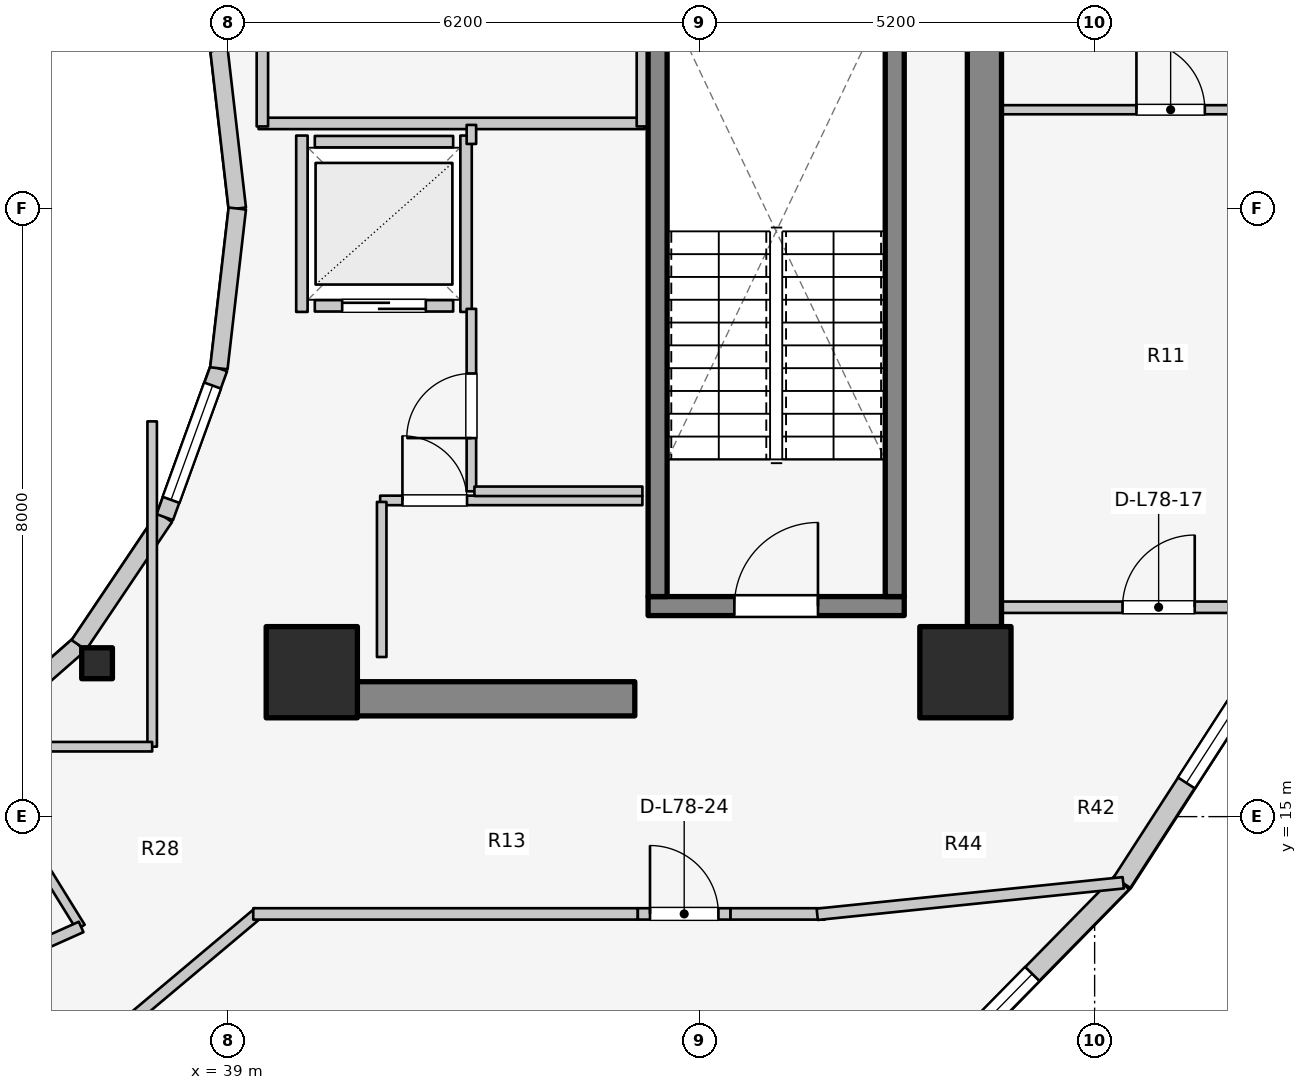
"""IFC4 building model, lengths in metres.
Left out: names, types, materials, properties, quantities, classifications, styles, units other than length and angle.
Written with IfcOpenShell. Run it as: python <this file> out.ifc"""

import sys

from ifc_helpers import new_model, si_unit, direction, frame, frame_2d, origin, origin_2d, place, context, subcontext, project, spatial, rectangle, i_section, extrude, element, fill, save


model = new_model("IFC4")
c1 = context("Model", 3, precision=1e-05, world=origin(), true_north=direction((0.0, 1.0)))
c2 = subcontext(c1, "Body", "Model", "MODEL_VIEW")
j1 = project(units=[si_unit("LENGTHUNIT", "METRE"), si_unit("PLANEANGLEUNIT", "RADIAN")], contexts=[c1])
p1 = place(None, origin())
s1 = spatial("IfcSite", under=j1, at=p1, CompositionType="ELEMENT")
p2 = place(p1, origin())
s2 = spatial("IfcBuilding", under=s1, at=p2, CompositionType="ELEMENT")
p3 = place(p2, frame((0.0, 0.0, 256.8)))
s3 = spatial("IfcBuildingStorey", under=s2, at=p3, CompositionType="ELEMENT", Elevation=256.8)
p4 = place(p3, frame((48.95, 17.05, 0.0), z_axis=(0.0, 0.0, 1.0), x_axis=(0.0, 1.0, 0.0)))
e1 = element("IfcWall", 1, at=p4, inside=s3, PredefinedType="SHEAR", context=c2, shape_type="SweptSolid", body=[
    extrude(rectangle(XDim=12.8, YDim=0.45, at=frame_2d((6.4, 0.0))), origin(), (0.0, 0.0, 1.0), 3.6),
])
p5 = place(p3, frame((39.85, 16.55, 0.0), z_axis=(0.0, 0.0, 1.0), x_axis=(1.0, 0.0, 0.0)))
e2 = element("IfcWall", 2, at=p5, inside=s3, PredefinedType="SHEAR", context=c2, shape_type="SweptSolid", body=[
    extrude(rectangle(XDim=4.5, YDim=0.45, at=frame_2d((2.25, 0.0))), origin(), (0.0, 0.0, 1.0), 3.6),
])
p6 = place(p3, frame((44.525, 17.77, 0.0), z_axis=(0.0, 0.0, 1.0), x_axis=(1.0, 0.0, 0.0)))
e3 = element("IfcWall", 3, at=p6, inside=s3, PredefinedType="SOLIDWALL", context=c2, shape_type="SweptSolid", body=[
    extrude(rectangle(XDim=3.37, YDim=0.25, at=frame_2d((1.685, 0.0))), origin(), (0.0, 0.0, 1.0), 3.6),
])
p7 = place(p6, frame((1.135, 0.0, 0.0)))
e4 = element("IfcOpeningElement", 4, at=p7, cuts=e3, PredefinedType="OPENING", context=c2, shape_type="SweptSolid", body=[
    extrude(rectangle(XDim=1.1, YDim=2.1, at=frame_2d((0.55, 1.05))), frame((0.0, 0.135, 0.0), z_axis=(0.0, -1.0, 0.0), x_axis=(1.0, 0.0, 0.0)), (0.0, 0.0, 1.0), 0.27),
])
for number, where, z_axis, x_axis in (
    (5, (44.65, 17.895, 0.0), (0.0, 0.0, 1.0), (0.0, 1.0, 0.0)),
    (6, (47.77, 17.895, 0.0), (0.0, 0.0, 1.0), (0.0, 1.0, 0.0)),
):
    element("IfcWall", number, at=place(p3, frame(where, z_axis=z_axis, x_axis=x_axis)), inside=s3, PredefinedType="SOLIDWALL", context=c2, shape_type="SweptSolid", body=[
        extrude(rectangle(XDim=7.81, YDim=0.25, at=frame_2d((3.905, 0.0))), origin(), (0.0, 0.0, 1.0), 3.6),
    ])
for number, where, z_axis, x_axis in (
    (7, (40.1, 16.9, 0.0), (0.0, 0.0, 1.0), (1.0, 0.0, 0.0)),
    (8, (48.7, 16.9, 0.0), (0.0, 0.0, 1.0), (1.0, 0.0, 0.0)),
):
    element("IfcColumn", number, at=place(p3, frame(where, z_axis=z_axis, x_axis=x_axis)), inside=s3, PredefinedType="COLUMN", context=c2, shape_type="SweptSolid", body=[
        extrude(rectangle(XDim=1.2, YDim=1.2, at=origin_2d()), origin(), (0.0, 0.0, 1.0), 3.6),
    ])
p8 = place(p3, frame((37.275, 17.018, 0.0), z_axis=(0.0, 0.0, 1.0), x_axis=(1.0, 0.0, 0.0)))
e9 = element("IfcColumn", 9, at=p8, inside=s3, PredefinedType="COLUMN", context=c2, shape_type="SweptSolid", body=[
    extrude(i_section(OverallWidth=0.404, OverallDepth=0.407, WebThickness=0.027, FlangeThickness=0.044, FilletRadius=0.025, at=origin_2d()), origin(), (0.0, 0.0, 1.0), 3.6),
])
p9 = place(p3, frame((39.12, 23.0, 0.0), z_axis=(0.0, 0.0, 1.0), x_axis=(-0.114711713601, 0.993398823617, 0.0)))
e10 = element("IfcWall", 10, at=p9, inside=s3, PredefinedType="STANDARD", context=c2, shape_type="SweptSolid", body=[
    extrude(rectangle(XDim=2.115, YDim=0.23, at=frame_2d((1.058, 0.0))), origin(), (0.0, 0.0, 1.0), 3.06),
])
p10 = place(p3, frame((35.56, 15.968, 0.0), z_axis=(0.0, 0.0, 1.0), x_axis=(0.752576694707, 0.658504607869, 0.0)))
e11 = element("IfcWall", 11, at=p10, inside=s3, PredefinedType="STANDARD", context=c2, shape_type="SweptSolid", body=[
    extrude(rectangle(XDim=1.959, YDim=0.23, at=frame_2d((0.98, 0.0))), origin(), (0.0, 0.0, 1.0), 1.72),
])
p11 = place(p3, frame((37.035, 17.258, 0.0), z_axis=(0.0, 0.0, 1.0), x_axis=(0.558197800898, 0.829707909492, 0.0)))
e12 = element("IfcWall", 12, at=p11, inside=s3, PredefinedType="STANDARD", context=c2, shape_type="SweptSolid", body=[
    extrude(rectangle(XDim=2.027, YDim=0.23, at=frame_2d((1.013, 0.0))), origin(), (0.0, 0.0, 1.0), 1.72),
])
p12 = place(p3, frame((38.166, 18.94, 0.0), z_axis=(0.0, 0.0, 1.0), x_axis=(0.341423187295, 0.93990968033, 0.0)))
e13 = element("IfcWall", 13, at=p12, inside=s3, PredefinedType="STANDARD", context=c2, shape_type="SweptSolid", body=[
    extrude(rectangle(XDim=2.084, YDim=0.23, at=frame_2d((1.042, 0.0))), origin(), (0.0, 0.0, 1.0), 3.06),
])
p13 = place(p12, frame((0.242, 0.0, 0.85)))
e14 = element("IfcOpeningElement", 14, at=p13, cuts=e13, PredefinedType="OPENING", context=c2, shape_type="SweptSolid", body=[
    extrude(rectangle(XDim=1.6, YDim=1.65, at=frame_2d((0.8, 0.825))), frame((0.0, 0.125, 0.0), z_axis=(0.0, -1.0, 0.0), x_axis=(1.0, 0.0, 0.0)), (0.0, 0.0, 1.0), 0.25),
])
p14 = place(p3, frame((38.877, 20.898, 0.0), z_axis=(0.0, 0.0, 1.0), x_axis=(0.114711713601, 0.993398823617, 0.0)))
e15 = element("IfcWall", 15, at=p14, inside=s3, PredefinedType="STANDARD", context=c2, shape_type="SweptSolid", body=[
    extrude(rectangle(XDim=2.115, YDim=0.23, at=frame_2d((1.058, 0.0))), origin(), (0.0, 0.0, 1.0), 3.06),
])
p15 = place(p3, frame((47.558, 10.871, 0.0), z_axis=(0.0, 0.0, 1.0), x_axis=(0.700642973333, 0.713512034881, 0.0)))
e16 = element("IfcWall", 16, at=p15, inside=s3, PredefinedType="STANDARD", context=c2, shape_type="SweptSolid", body=[
    extrude(rectangle(XDim=4.572, YDim=0.26, at=frame_2d((2.286, 0.0))), origin(), (0.0, 0.0, 1.0), 1.72),
])
p16 = place(p15, frame((1.686, 0.0, 0.15)))
e17 = element("IfcOpeningElement", 17, at=p16, cuts=e16, PredefinedType="OPENING", context=c2, shape_type="SweptSolid", body=[
    extrude(rectangle(XDim=1.2, YDim=0.9, at=frame_2d((0.6, 0.45))), frame((0.0, 0.14, 0.0), z_axis=(0.0, -1.0, 0.0), x_axis=(1.0, 0.0, 0.0)), (0.0, 0.0, 1.0), 0.28),
])
p17 = place(p3, frame((50.761, 14.133, 0.0), z_axis=(0.0, 0.0, 1.0), x_axis=(0.542641766008, 0.839964233634, 0.0)))
e18 = element("IfcWall", 18, at=p17, inside=s3, PredefinedType="STANDARD", context=c2, shape_type="SweptSolid", body=[
    extrude(rectangle(XDim=4.319, YDim=0.26, at=frame_2d((2.16, 0.0))), origin(), (0.0, 0.0, 1.0), 1.72),
])
p18 = place(p17, frame((1.56, 0.0, 0.15)))
e19 = element("IfcOpeningElement", 19, at=p18, cuts=e18, PredefinedType="OPENING", context=c2, shape_type="SweptSolid", body=[
    extrude(rectangle(XDim=1.2, YDim=0.9, at=frame_2d((0.6, 0.45))), frame((0.0, 0.14, 0.0), z_axis=(0.0, -1.0, 0.0), x_axis=(1.0, 0.0, 0.0)), (0.0, 0.0, 1.0), 0.28),
])
p19 = place(p3, frame((40.14, 21.72, 0.0), z_axis=(0.0, 0.0, 1.0), x_axis=(1.0, 0.0, 0.0)))
e20 = element("IfcWall", 20, at=p19, inside=s3, PredefinedType="SOLIDWALL", context=c2, shape_type="SweptSolid", body=[
    extrude(rectangle(XDim=1.82, YDim=0.15, at=frame_2d((0.91, 0.0))), origin(), (0.0, 0.0, 1.0), 2.62),
])
p20 = place(p19, frame((0.36, 0.0, 0.0)))
e21 = element("IfcOpeningElement", 21, at=p20, cuts=e20, PredefinedType="OPENING", context=c2, shape_type="SweptSolid", body=[
    extrude(rectangle(XDim=1.1, YDim=2.1, at=frame_2d((0.55, 1.05))), frame((0.0, 0.085, 0.0), z_axis=(0.0, -1.0, 0.0), x_axis=(1.0, 0.0, 0.0)), (0.0, 0.0, 1.0), 0.17),
])
p21 = place(p3, frame((40.14, 23.88, 0.0), z_axis=(0.0, 0.0, 1.0), x_axis=(1.0, 0.0, 0.0)))
e22 = element("IfcWall", 22, at=p21, inside=s3, PredefinedType="SOLIDWALL", context=c2, shape_type="SweptSolid", body=[
    extrude(rectangle(XDim=1.82, YDim=0.15, at=frame_2d((0.91, 0.0))), origin(), (0.0, 0.0, 1.0), 2.62),
])
p22 = place(p3, frame((39.97, 21.64, 0.0), z_axis=(0.0, 0.0, 1.0), x_axis=(0.0, 1.0, 0.0)))
e23 = element("IfcWall", 23, at=p22, inside=s3, PredefinedType="SOLIDWALL", context=c2, shape_type="SweptSolid", body=[
    extrude(rectangle(XDim=2.32, YDim=0.15, at=frame_2d((1.16, 0.0))), origin(), (0.0, 0.0, 1.0), 2.62),
])
p23 = place(p3, frame((42.13, 21.64, 0.0), z_axis=(0.0, 0.0, 1.0), x_axis=(0.0, 1.0, 0.0)))
e24 = element("IfcWall", 24, at=p23, inside=s3, PredefinedType="SOLIDWALL", context=c2, shape_type="SweptSolid", body=[
    extrude(rectangle(XDim=2.32, YDim=0.15, at=frame_2d((1.16, 0.0))), origin(), (0.0, 0.0, 1.0), 3.075),
])
p24 = place(p3, frame((39.4, 24.12, 0.0), z_axis=(0.0, 0.0, 1.0), x_axis=(1.0, 0.0, 0.0)))
e25 = element("IfcWall", 25, at=p24, inside=s3, PredefinedType="PARTITIONING", context=c2, shape_type="SweptSolid", body=[
    extrude(rectangle(XDim=5.08, YDim=0.15, at=frame_2d((2.54, 0.0))), origin(), (0.0, 0.0, 1.0), 2.62),
])
p25 = place(p3, frame((44.45, 24.08, 0.0), z_axis=(0.0, 0.0, 1.0), x_axis=(0.0, 1.0, 0.0)))
e26 = element("IfcWall", 26, at=p25, inside=s3, PredefinedType="PARTITIONING", context=c2, shape_type="SweptSolid", body=[
    extrude(rectangle(XDim=3.2, YDim=0.15, at=frame_2d((1.6, 0.0))), origin(), (0.0, 0.0, 1.0), 3.075),
])
p26 = place(p3, frame((39.45, 24.08, 0.0), z_axis=(0.0, 0.0, 1.0), x_axis=(0.0, 1.0, 0.0)))
e27 = element("IfcWall", 27, at=p26, inside=s3, PredefinedType="PARTITIONING", context=c2, shape_type="SweptSolid", body=[
    extrude(rectangle(XDim=3.4, YDim=0.15, at=frame_2d((1.7, 0.0))), origin(), (0.0, 0.0, 1.0), 3.075),
])
p27 = place(p26, frame((1.894, 0.0, 0.0)))
e28 = element("IfcOpeningElement", 28, at=p27, cuts=e27, PredefinedType="OPENING", context=c2, shape_type="SweptSolid", body=[
    extrude(rectangle(XDim=1.1, YDim=2.1, at=frame_2d((0.55, 1.05))), frame((0.0, 0.085, 0.0), z_axis=(0.0, -1.0, 0.0), x_axis=(1.0, 0.0, 0.0)), (0.0, 0.0, 1.0), 0.17),
])
p28 = place(p3, frame((41.0, 19.16, 0.0), z_axis=(0.0, 0.0, 1.0), x_axis=(1.0, 0.0, 0.0)))
e29 = element("IfcWall", 29, at=p28, inside=s3, PredefinedType="PARTITIONING", context=c2, shape_type="SweptSolid", body=[
    extrude(rectangle(XDim=3.45, YDim=0.125, at=frame_2d((1.725, 0.0))), origin(), (0.0, 0.0, 1.0), 2.62),
])
p29 = place(p28, frame((0.293, 0.0, 0.0)))
e30 = element("IfcOpeningElement", 30, at=p29, cuts=e29, PredefinedType="OPENING", context=c2, shape_type="SweptSolid", body=[
    extrude(rectangle(XDim=0.85, YDim=2.05, at=frame_2d((0.425, 1.025))), frame((0.0, 0.073, 0.0), z_axis=(0.0, -1.0, 0.0), x_axis=(1.0, 0.0, 0.0)), (0.0, 0.0, 1.0), 0.145),
])
p30 = place(p3, frame((41.02, 17.1, 0.0), z_axis=(0.0, 0.0, 1.0), x_axis=(0.0, 1.0, 0.0)))
e31 = element("IfcWall", 31, at=p30, inside=s3, PredefinedType="PARTITIONING", context=c2, shape_type="SweptSolid", body=[
    extrude(rectangle(XDim=2.04, YDim=0.125, at=frame_2d((1.02, 0.0))), origin(), (0.0, 0.0, 1.0), 3.075),
])
p31 = place(p3, frame((42.2, 19.28, 0.0), z_axis=(0.0, 0.0, 1.0), x_axis=(0.0, 1.0, 0.0)))
e32 = element("IfcWall", 32, at=p31, inside=s3, PredefinedType="PARTITIONING", context=c2, shape_type="SweptSolid", body=[
    extrude(rectangle(XDim=2.4, YDim=0.125, at=frame_2d((1.2, 0.0))), origin(), (0.0, 0.0, 1.0), 3.075),
])
p32 = place(p31, frame((0.7, 0.0, 0.0)))
e33 = element("IfcOpeningElement", 33, at=p32, cuts=e32, PredefinedType="OPENING", context=c2, shape_type="SweptSolid", body=[
    extrude(rectangle(XDim=0.85, YDim=2.05, at=frame_2d((0.425, 1.025))), frame((0.0, 0.073, 0.0), z_axis=(0.0, -1.0, 0.0), x_axis=(1.0, 0.0, 0.0)), (0.0, 0.0, 1.0), 0.145),
])
p33 = place(p3, frame((42.2, 23.85, 0.0), z_axis=(0.0, 0.0, 1.0), x_axis=(0.0, 1.0, 0.0)))
e34 = element("IfcWall", 34, at=p33, inside=s3, PredefinedType="PARTITIONING", context=c2, shape_type="SweptSolid", body=[
    extrude(rectangle(XDim=0.25, YDim=0.125, at=frame_2d((0.125, 0.0))), origin(), (0.0, 0.0, 1.0), 3.075),
])
p34 = place(p3, frame((42.24, 19.28, 0.0), z_axis=(0.0, 0.0, 1.0), x_axis=(1.0, 0.0, 0.0)))
e35 = element("IfcWall", 35, at=p34, inside=s3, PredefinedType="PARTITIONING", context=c2, shape_type="SweptSolid", body=[
    extrude(rectangle(XDim=2.21, YDim=0.125, at=frame_2d((1.105, 0.0))), origin(), (0.0, 0.0, 1.0), 2.62),
])
p35 = place(p3, frame((35.55, 15.985, 0.0), z_axis=(0.0, 0.0, 1.0), x_axis=(0.52592395012, -0.850531597702, 0.0)))
e36 = element("IfcWall", 36, at=p35, inside=s3, PredefinedType="PARTITIONING", context=c2, shape_type="SweptSolid", body=[
    extrude(rectangle(XDim=2.869, YDim=0.125, at=frame_2d((1.435, 0.0))), origin(), (0.0, 0.0, 1.0), 1.72),
])
p36 = place(p3, frame((36.525, 13.307, 0.0), z_axis=(0.0, 0.0, 1.0), x_axis=(0.912838500798, 0.408320794794, 0.0)))
e37 = element("IfcWall", 37, at=p36, inside=s3, PredefinedType="PARTITIONING", context=c2, shape_type="SweptSolid", body=[
    extrude(rectangle(XDim=0.591, YDim=0.15, at=frame_2d((0.296, 0.0))), origin(), (0.0, 0.0, 1.0), 3.075),
])
p37 = place(p3, frame((38.0, 15.92, 0.0), z_axis=(0.0, 0.0, 1.0), x_axis=(0.0, 1.0, 0.0)))
e38 = element("IfcWall", 38, at=p37, inside=s3, PredefinedType="PARTITIONING", context=c2, shape_type="SweptSolid", body=[
    extrude(rectangle(XDim=4.28, YDim=0.125, at=frame_2d((2.14, 0.0))), origin(), (0.0, 0.0, 1.0), 1.72),
])
p38 = place(p3, frame((35.4, 15.92, 0.0), z_axis=(0.0, 0.0, 1.0), x_axis=(1.0, 0.0, 0.0)))
e39 = element("IfcWall", 39, at=p38, inside=s3, PredefinedType="PARTITIONING", context=c2, shape_type="SweptSolid", body=[
    extrude(rectangle(XDim=2.6, YDim=0.125, at=frame_2d((1.3, 0.0))), origin(), (0.0, 0.0, 1.0), 1.72),
])
p39 = place(p3, frame((48.95, 17.755, 0.0), z_axis=(0.0, 0.0, 1.0), x_axis=(1.0, 0.0, 0.0)))
e40 = element("IfcWall", 40, at=p39, inside=s3, PredefinedType="PARTITIONING", context=c2, shape_type="SweptSolid", body=[
    extrude(rectangle(XDim=4.175, YDim=0.15, at=frame_2d((2.087, 0.0))), origin(), (0.0, 0.0, 1.0), 3.075),
])
p40 = place(p39, frame((1.817, 0.0, 0.0)))
e41 = element("IfcOpeningElement", 41, at=p40, cuts=e40, PredefinedType="OPENING", context=c2, shape_type="SweptSolid", body=[
    extrude(rectangle(XDim=0.95, YDim=2.1, at=frame_2d((0.475, 1.05))), frame((0.0, 0.085, 0.0), z_axis=(0.0, -1.0, 0.0), x_axis=(1.0, 0.0, 0.0)), (0.0, 0.0, 1.0), 0.17),
])
p41 = place(p3, frame((48.95, 24.3, 0.0), z_axis=(0.0, 0.0, 1.0), x_axis=(1.0, 0.0, 0.0)))
e42 = element("IfcWall", 42, at=p41, inside=s3, PredefinedType="MOVABLE", context=c2, shape_type="SweptSolid", body=[
    extrude(rectangle(XDim=4.683, YDim=0.12, at=frame_2d((2.341, 0.0))), origin(), (0.0, 0.0, 1.0), 3.075),
])
p42 = place(p41, frame((2.0, 0.0, 0.0)))
e43 = element("IfcOpeningElement", 43, at=p42, cuts=e42, PredefinedType="OPENING", context=c2, shape_type="SweptSolid", body=[
    extrude(rectangle(XDim=0.9, YDim=2.1, at=frame_2d((0.45, 1.05))), frame((0.0, 0.07, 0.0), z_axis=(0.0, -1.0, 0.0), x_axis=(1.0, 0.0, 0.0)), (0.0, 0.0, 1.0), 0.14),
])
p43 = place(p3, frame((37.791, 12.385, 0.0), z_axis=(0.0, 0.0, 1.0), x_axis=(0.765677451641, 0.643224719711, 0.0)))
e44 = element("IfcWall", 44, at=p43, inside=s3, PredefinedType="PARTITIONING", context=c2, shape_type="SweptSolid", body=[
    extrude(rectangle(XDim=2.105, YDim=0.15, at=frame_2d((1.053, 0.0))), origin(), (0.0, 0.0, 1.0), 1.72),
])
p44 = place(p3, frame((39.33, 13.72, 0.0), z_axis=(0.0, 0.0, 1.0), x_axis=(1.0, 0.0, 0.0)))
e45 = element("IfcWall", 45, at=p44, inside=s3, PredefinedType="PARTITIONING", context=c2, shape_type="SweptSolid", body=[
    extrude(rectangle(XDim=5.06, YDim=0.15, at=frame_2d((2.53, 0.0))), origin(), (0.0, 0.0, 1.0), 1.72),
])
p45 = place(p3, frame((44.39, 13.72, 0.0), z_axis=(0.0, 0.0, 1.0), x_axis=(1.0, 0.0, 0.0)))
e46 = element("IfcWall", 46, at=p45, inside=s3, PredefinedType="PARTITIONING", context=c2, shape_type="SweptSolid", body=[
    extrude(rectangle(XDim=1.22, YDim=0.15, at=frame_2d((0.61, 0.0))), origin(), (0.0, 0.0, 1.0), 3.075),
])
p46 = place(p45, frame((0.16, 0.0, 0.0)))
e47 = element("IfcOpeningElement", 47, at=p46, cuts=e46, PredefinedType="OPENING", context=c2, shape_type="SweptSolid", body=[
    extrude(rectangle(XDim=0.9, YDim=2.1, at=frame_2d((0.45, 1.05))), frame((0.0, 0.085, 0.0), z_axis=(0.0, -1.0, 0.0), x_axis=(1.0, 0.0, 0.0)), (0.0, 0.0, 1.0), 0.17),
])
p47 = place(p3, frame((45.61, 13.72, 0.0), z_axis=(0.0, 0.0, 1.0), x_axis=(1.0, 0.0, 0.0)))
e48 = element("IfcWall", 48, at=p47, inside=s3, PredefinedType="PARTITIONING", context=c2, shape_type="SweptSolid", body=[
    extrude(rectangle(XDim=1.24, YDim=0.15, at=frame_2d((0.62, 0.0))), origin(), (0.0, 0.0, 1.0), 1.72),
])
p48 = place(p3, frame((46.75, 13.715, 0.0), z_axis=(0.0, 0.0, 1.0), x_axis=(0.994734711466, 0.102483431859, 0.0)))
e49 = element("IfcWall", 49, at=p48, inside=s3, PredefinedType="PARTITIONING", context=c2, shape_type="SweptSolid", body=[
    extrude(rectangle(XDim=4.047, YDim=0.15, at=frame_2d((2.024, 0.0))), origin(), (0.0, 0.0, 1.0), 1.72),
])
p49 = place(p13, origin())
e50 = element("IfcWindow", 50, at=p49, inside=s3, PartitioningType="SINGLE_PANEL", PredefinedType="WINDOW", context=c2, shape_type="SweptSolid", body=[
    extrude(rectangle(XDim=1.6, YDim=1.65, at=frame_2d((0.8, 0.825))), frame((0.0, 0.03, 0.0), z_axis=(0.0, -1.0, 0.0), x_axis=(1.0, 0.0, 0.0)), (0.0, 0.0, 1.0), 0.06),
])
fill(e14, e50)
p50 = place(p16, origin())
e51 = element("IfcWindow", 51, at=p50, inside=s3, PartitioningType="SINGLE_PANEL", PredefinedType="WINDOW", context=c2, shape_type="SweptSolid", body=[
    extrude(rectangle(XDim=1.2, YDim=0.9, at=frame_2d((0.6, 0.45))), frame((0.0, 0.03, 0.0), z_axis=(0.0, -1.0, 0.0), x_axis=(1.0, 0.0, 0.0)), (0.0, 0.0, 1.0), 0.06),
])
fill(e17, e51)
p51 = place(p18, origin())
e52 = element("IfcWindow", 52, at=p51, inside=s3, PartitioningType="SINGLE_PANEL", PredefinedType="WINDOW", context=c2, shape_type="SweptSolid", body=[
    extrude(rectangle(XDim=1.2, YDim=0.9, at=frame_2d((0.6, 0.45))), frame((0.0, 0.03, 0.0), z_axis=(0.0, -1.0, 0.0), x_axis=(1.0, 0.0, 0.0)), (0.0, 0.0, 1.0), 0.06),
])
fill(e19, e52)
p52 = place(p7, origin())
e53 = element("IfcDoor", 53, at=p52, inside=s3, OperationType="SINGLE_SWING_RIGHT", PredefinedType="DOOR", context=c2, shape_type="SweptSolid", body=[
    extrude(rectangle(XDim=1.1, YDim=2.1, at=frame_2d((0.55, 1.05))), frame((0.0, 0.025, 0.0), z_axis=(0.0, -1.0, 0.0), x_axis=(1.0, 0.0, 0.0)), (0.0, 0.0, 1.0), 0.05),
])
fill(e4, e53)
p53 = place(p20, origin())
e54 = element("IfcDoor", 54, at=p53, inside=s3, OperationType="DOUBLE_DOOR_SLIDING", PredefinedType="DOOR", context=c2, shape_type="SweptSolid", body=[
    extrude(rectangle(XDim=1.1, YDim=2.1, at=frame_2d((0.55, 1.05))), frame((0.0, 0.025, 0.0), z_axis=(0.0, -1.0, 0.0), x_axis=(1.0, 0.0, 0.0)), (0.0, 0.0, 1.0), 0.05),
])
fill(e21, e54)
p54 = place(p29, origin())
e55 = element("IfcDoor", 55, at=p54, inside=s3, OperationType="SINGLE_SWING_LEFT", PredefinedType="DOOR", context=c2, shape_type="SweptSolid", body=[
    extrude(rectangle(XDim=0.85, YDim=2.05, at=frame_2d((0.425, 1.025))), frame((0.0, 0.025, 0.0), z_axis=(0.0, -1.0, 0.0), x_axis=(1.0, 0.0, 0.0)), (0.0, 0.0, 1.0), 0.05),
])
fill(e30, e55)
p55 = place(p32, origin())
e56 = element("IfcDoor", 56, at=p55, inside=s3, OperationType="SINGLE_SWING_LEFT", PredefinedType="DOOR", context=c2, shape_type="SweptSolid", body=[
    extrude(rectangle(XDim=0.85, YDim=2.05, at=frame_2d((0.425, 1.025))), frame((0.0, 0.025, 0.0), z_axis=(0.0, -1.0, 0.0), x_axis=(1.0, 0.0, 0.0)), (0.0, 0.0, 1.0), 0.05),
])
fill(e33, e56)
p56 = place(p40, origin())
e57 = element("IfcDoor", 57, at=p56, inside=s3, OperationType="SINGLE_SWING_RIGHT", PredefinedType="DOOR", context=c2, shape_type="SweptSolid", body=[
    extrude(rectangle(XDim=0.95, YDim=2.1, at=frame_2d((0.475, 1.05))), frame((0.0, 0.025, 0.0), z_axis=(0.0, -1.0, 0.0), x_axis=(1.0, 0.0, 0.0)), (0.0, 0.0, 1.0), 0.05),
])
fill(e41, e57)
p57 = place(p42, origin())
e58 = element("IfcDoor", 58, at=p57, inside=s3, OperationType="SINGLE_SWING_LEFT", PredefinedType="DOOR", context=c2, shape_type="SweptSolid", body=[
    extrude(rectangle(XDim=0.9, YDim=2.1, at=frame_2d((0.45, 1.05))), frame((0.0, 0.025, 0.0), z_axis=(0.0, -1.0, 0.0), x_axis=(1.0, 0.0, 0.0)), (0.0, 0.0, 1.0), 0.05),
])
fill(e43, e58)
p58 = place(p46, origin())
e59 = element("IfcDoor", 59, at=p58, inside=s3, OperationType="SINGLE_SWING_LEFT", PredefinedType="DOOR", context=c2, shape_type="SweptSolid", body=[
    extrude(rectangle(XDim=0.9, YDim=2.1, at=frame_2d((0.45, 1.05))), frame((0.0, 0.025, 0.0), z_axis=(0.0, -1.0, 0.0), x_axis=(1.0, 0.0, 0.0)), (0.0, 0.0, 1.0), 0.05),
])
fill(e47, e59)
save(model, sys.argv[1])
